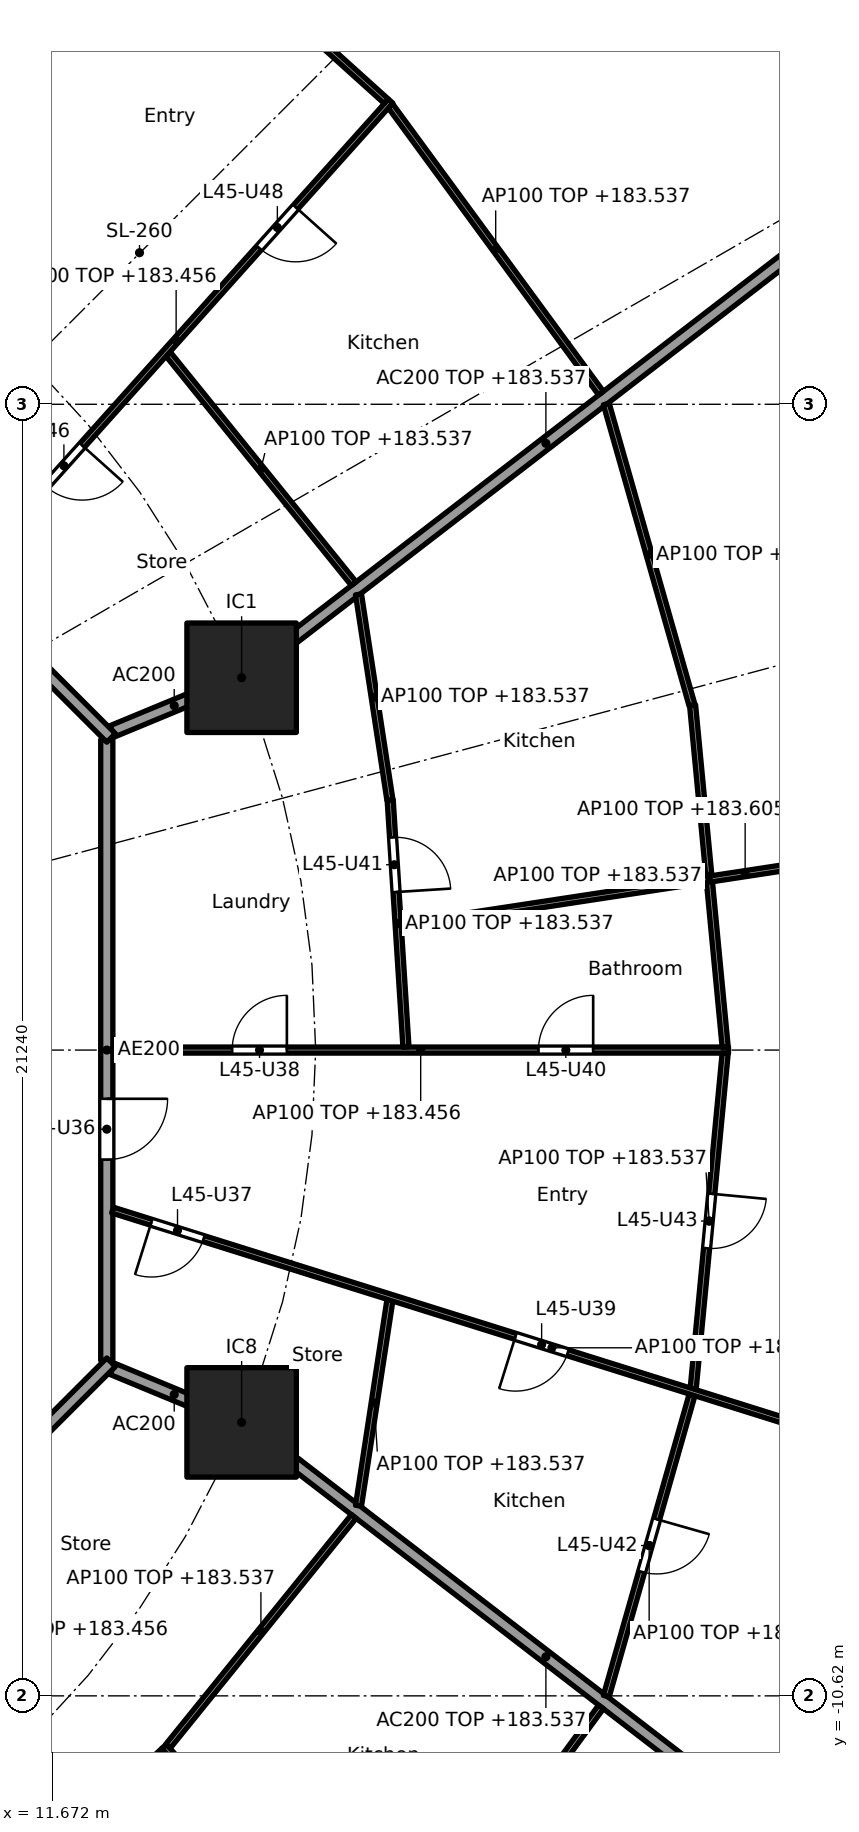
"""IFC4 building model, lengths in metres.
Left out: names, types, materials, properties, quantities, classifications, styles, units other than length and angle.
Written with IfcOpenShell. Run it as: python <this file> out.ifc"""

import sys

from ifc_helpers import new_model, si_unit, direction, frame, frame_2d, origin, origin_2d, place, context, subcontext, project, spatial, rectangle, extrude, element, fill, save


model = new_model("IFC4")
c1 = context("Model", 3, precision=1e-05, world=origin(), true_north=direction((0.0, 1.0)))
c2 = subcontext(c1, "Body", "Model", "MODEL_VIEW")
j1 = project(units=[si_unit("LENGTHUNIT", "METRE"), si_unit("PLANEANGLEUNIT", "RADIAN")], contexts=[c1])
p1 = place(None, origin())
s1 = spatial("IfcSite", under=j1, at=p1, CompositionType="ELEMENT")
p2 = place(p1, origin())
s2 = spatial("IfcBuilding", under=s1, at=p2, CompositionType="ELEMENT")
p3 = place(p2, frame((0.0, 0.0, 180.7)))
s3 = spatial("IfcBuildingStorey", under=s2, at=p3, CompositionType="ELEMENT", Elevation=180.7)
for number, where, z_axis, x_axis in (
    (1, (14.782, 6.123, 0.0), (0.0, 0.0, 1.0), (1.0, 0.0, 0.0)),
    (2, (14.782, -6.123, 0.0), (0.0, 0.0, 1.0), (1.0, 0.0, 0.0)),
):
    element("IfcColumn", number, at=place(p3, frame(where, z_axis=z_axis, x_axis=x_axis)), inside=s3, PredefinedType="COLUMN", context=c2, shape_type="SweptSolid", body=[
        extrude(rectangle(XDim=1.8, YDim=1.8, at=origin_2d()), origin(), (0.0, 0.0, 1.0), 3.7),
    ])
p4 = place(p3, frame((12.657, 5.243, 0.0), z_axis=(0.0, 0.0, 1.0), x_axis=(0.92383017907, 0.382802560388, 0.0)))
e3 = element("IfcWall", 3, at=p4, inside=s3, PredefinedType="PARTITIONING", context=c2, shape_type="SweptSolid", body=[
    extrude(rectangle(XDim=2.2, YDim=0.2, at=frame_2d((1.1, 0.0))), origin(), (0.0, 0.0, 1.0), 3.44),
])
p5 = place(p3, frame((14.822, 6.154, 0.0), z_axis=(0.0, 0.0, 1.0), x_axis=(0.792203056092, 0.610257583254, 0.0)))
e4 = element("IfcWall", 4, at=p5, inside=s3, PredefinedType="PARTITIONING", context=c2, shape_type="SweptSolid", body=[
    extrude(rectangle(XDim=12.533, YDim=0.2, at=frame_2d((6.266, 0.0))), origin(), (0.0, 0.0, 1.0), 2.837),
])
p6 = place(p3, frame((12.657, -5.243, 0.0), z_axis=(0.0, 0.0, 1.0), x_axis=(0.92383017907, -0.382802560388, 0.0)))
e5 = element("IfcWall", 5, at=p6, inside=s3, PredefinedType="PARTITIONING", context=c2, shape_type="SweptSolid", body=[
    extrude(rectangle(XDim=2.2, YDim=0.2, at=frame_2d((1.1, 0.0))), origin(), (0.0, 0.0, 1.0), 3.44),
])
p7 = place(p3, frame((14.822, -6.154, 0.0), z_axis=(0.0, 0.0, 1.0), x_axis=(0.792203056092, -0.610257583254, 0.0)))
e6 = element("IfcWall", 6, at=p7, inside=s3, PredefinedType="PARTITIONING", context=c2, shape_type="SweptSolid", body=[
    extrude(rectangle(XDim=12.533, YDim=0.2, at=frame_2d((6.266, 0.0))), origin(), (0.0, 0.0, 1.0), 2.837),
])
p8 = place(p3, frame((12.565, -5.104, 0.0), z_axis=(0.0, 0.0, 1.0), x_axis=(0.0, 1.0, 0.0)))
e7 = element("IfcWall", 7, at=p8, inside=s3, PredefinedType="PARTITIONING", context=c2, shape_type="SweptSolid", body=[
    extrude(rectangle(XDim=10.209, YDim=0.2, at=frame_2d((5.104, 0.0))), origin(), (0.0, 0.0, 1.0), 3.44),
])
p9 = place(p8, frame((3.303, 0.0, 0.0)))
e8 = element("IfcOpeningElement", 8, at=p9, cuts=e7, PredefinedType="OPENING", context=c2, shape_type="SweptSolid", body=[
    extrude(rectangle(XDim=1.0, YDim=2.1, at=frame_2d((0.5, 1.05))), frame((0.0, 0.11, 0.0), z_axis=(0.0, -1.0, 0.0), x_axis=(1.0, 0.0, 0.0)), (0.0, 0.0, 1.0), 0.22),
])
p10 = place(p3, frame((12.635, 5.134, 0.0), z_axis=(0.0, 0.0, 1.0), x_axis=(-0.707106781187, 0.707106781187, 0.0)))
e9 = element("IfcWall", 9, at=p10, inside=s3, PredefinedType="PARTITIONING", context=c2, shape_type="SweptSolid", body=[
    extrude(rectangle(XDim=10.609, YDim=0.2, at=frame_2d((5.305, 0.0))), origin(), (0.0, 0.0, 1.0), 3.44),
])
p11 = place(p10, frame((4.804, 0.0, 0.0)))
e10 = element("IfcOpeningElement", 10, at=p11, cuts=e9, PredefinedType="OPENING", context=c2, shape_type="SweptSolid", body=[
    extrude(rectangle(XDim=1.0, YDim=2.1, at=frame_2d((0.5, 1.05))), frame((0.0, 0.11, 0.0), z_axis=(0.0, -1.0, 0.0), x_axis=(1.0, 0.0, 0.0)), (0.0, 0.0, 1.0), 0.22),
])
p12 = place(p3, frame((5.275, -12.494, 0.0), z_axis=(0.0, 0.0, 1.0), x_axis=(0.707106781187, 0.707106781187, 0.0)))
e11 = element("IfcWall", 11, at=p12, inside=s3, PredefinedType="PARTITIONING", context=c2, shape_type="SweptSolid", body=[
    extrude(rectangle(XDim=10.409, YDim=0.2, at=frame_2d((5.205, 0.0))), origin(), (0.0, 0.0, 1.0), 3.44),
])
p13 = place(p3, frame((12.665, 0.0, 0.0), z_axis=(0.0, 0.0, 1.0), x_axis=(1.0, 0.0, 0.0)))
e12 = element("IfcWall", 12, at=p13, inside=s3, PredefinedType="PARTITIONING", context=c2, shape_type="SweptSolid", body=[
    extrude(rectangle(XDim=10.124, YDim=0.1, at=frame_2d((5.062, 0.0))), origin(), (0.0, 0.0, 1.0), 2.756),
])
p14 = place(p13, frame((1.961, 0.0, 0.0)))
e13 = element("IfcOpeningElement", 13, at=p14, cuts=e12, PredefinedType="OPENING", context=c2, shape_type="SweptSolid", body=[
    extrude(rectangle(XDim=0.9, YDim=2.1, at=frame_2d((0.45, 1.05))), frame((0.0, 0.06, 0.0), z_axis=(0.0, -1.0, 0.0), x_axis=(1.0, 0.0, 0.0)), (0.0, 0.0, 1.0), 0.12),
])
p15 = place(p13, frame((6.999, 0.0, 0.0)))
e14 = element("IfcOpeningElement", 14, at=p15, cuts=e12, PredefinedType="OPENING", context=c2, shape_type="SweptSolid", body=[
    extrude(rectangle(XDim=0.9, YDim=2.1, at=frame_2d((0.45, 1.05))), frame((0.0, 0.06, 0.0), z_axis=(0.0, -1.0, 0.0), x_axis=(1.0, 0.0, 0.0)), (0.0, 0.0, 1.0), 0.12),
])
p16 = place(p3, frame((17.485, 0.05, 0.0), z_axis=(0.0, 0.0, 1.0), x_axis=(-0.063673473968, 0.997970785501, 0.0)))
e15 = element("IfcWall", 15, at=p16, inside=s3, PredefinedType="PARTITIONING", context=c2, shape_type="SweptSolid", body=[
    extrude(rectangle(XDim=4.072, YDim=0.1, at=frame_2d((2.036, 0.0))), origin(), (0.0, 0.0, 1.0), 2.837),
])
p17 = place(p16, frame((2.554, 0.0, 0.0)))
e16 = element("IfcOpeningElement", 16, at=p17, cuts=e15, PredefinedType="OPENING", context=c2, shape_type="SweptSolid", body=[
    extrude(rectangle(XDim=0.9, YDim=2.1, at=frame_2d((0.45, 1.05))), frame((0.0, 0.06, 0.0), z_axis=(0.0, -1.0, 0.0), x_axis=(1.0, 0.0, 0.0)), (0.0, 0.0, 1.0), 0.12),
])
p18 = place(p3, frame((22.734, 0.05, 0.0), z_axis=(0.0, 0.0, 1.0), x_axis=(-0.0949274088, 0.995484197292, 0.0)))
e17 = element("IfcWall", 17, at=p18, inside=s3, PredefinedType="PARTITIONING", context=c2, shape_type="SweptSolid", body=[
    extrude(rectangle(XDim=5.648, YDim=0.1, at=frame_2d((2.824, 0.0))), origin(), (0.0, 0.0, 1.0), 2.837),
])
p19 = place(p3, frame((22.734, -0.05, 0.0), z_axis=(0.0, 0.0, 1.0), x_axis=(-0.094923312677, -0.995484587882, 0.0)))
e18 = element("IfcWall", 18, at=p19, inside=s3, PredefinedType="PARTITIONING", context=c2, shape_type="SweptSolid", body=[
    extrude(rectangle(XDim=5.548, YDim=0.1, at=frame_2d((2.774, 0.0))), origin(), (0.0, 0.0, 1.0), 2.837),
])
p20 = place(p19, frame((2.324, 0.0, 0.0)))
e19 = element("IfcOpeningElement", 19, at=p20, cuts=e18, PredefinedType="OPENING", context=c2, shape_type="SweptSolid", body=[
    extrude(rectangle(XDim=0.9, YDim=2.1, at=frame_2d((0.45, 1.05))), frame((0.0, 0.06, 0.0), z_axis=(0.0, -1.0, 0.0), x_axis=(1.0, 0.0, 0.0)), (0.0, 0.0, 1.0), 0.12),
])
p21 = place(p3, frame((17.407, 2.039, 0.0), z_axis=(0.0, 0.0, 1.0), x_axis=(0.98858728603, 0.150649188184, 0.0)))
e20 = element("IfcWall", 20, at=p21, inside=s3, PredefinedType="PARTITIONING", context=c2, shape_type="SweptSolid", body=[
    extrude(rectangle(XDim=11.441, YDim=0.1, at=frame_2d((5.721, 0.0))), origin(), (0.0, 0.0, 1.0), 2.905),
])
p22 = place(p21, frame((7.832, 0.0, 0.0)))
e21 = element("IfcOpeningElement", 21, at=p22, cuts=e20, PredefinedType="OPENING", context=c2, shape_type="SweptSolid", body=[
    extrude(rectangle(XDim=0.9, YDim=2.1, at=frame_2d((0.45, 1.05))), frame((0.0, 0.06, 0.0), z_axis=(0.0, -1.0, 0.0), x_axis=(1.0, 0.0, 0.0)), (0.0, 0.0, 1.0), 0.12),
])
p23 = place(p3, frame((17.221, 4.113, 0.0), z_axis=(0.0, 0.0, 1.0), x_axis=(-0.1510806336, 0.988521442434, 0.0)))
e22 = element("IfcWall", 22, at=p23, inside=s3, PredefinedType="PARTITIONING", context=c2, shape_type="SweptSolid", body=[
    extrude(rectangle(XDim=3.419, YDim=0.1, at=frame_2d((1.71, 0.0))), origin(), (0.0, 0.0, 1.0), 2.837),
])
p24 = place(p3, frame((22.189, 5.67, 0.0), z_axis=(0.0, 0.0, 1.0), x_axis=(-0.273819702124, 0.961781040949, 0.0)))
e23 = element("IfcWall", 23, at=p24, inside=s3, PredefinedType="PARTITIONING", context=c2, shape_type="SweptSolid", body=[
    extrude(rectangle(XDim=5.152, YDim=0.1, at=frame_2d((2.576, 0.0))), origin(), (0.0, 0.0, 1.0), 2.837),
])
p25 = place(p3, frame((16.626, 7.67, 0.0), z_axis=(0.0, 0.0, 1.0), x_axis=(-0.628738316533, 0.777616955399, 0.0)))
e24 = element("IfcWall", 24, at=p25, inside=s3, PredefinedType="PARTITIONING", context=c2, shape_type="SweptSolid", body=[
    extrude(rectangle(XDim=4.857, YDim=0.1, at=frame_2d((2.429, 0.0))), origin(), (0.0, 0.0, 1.0), 2.837),
])
p26 = place(p3, frame((20.692, 10.802, 0.0), z_axis=(0.0, 0.0, 1.0), x_axis=(-0.591110768293, 0.806590391468, 0.0)))
e25 = element("IfcWall", 25, at=p26, inside=s3, PredefinedType="PARTITIONING", context=c2, shape_type="SweptSolid", body=[
    extrude(rectangle(XDim=5.86, YDim=0.1, at=frame_2d((2.93, 0.0))), origin(), (0.0, 0.0, 1.0), 2.837),
])
p27 = place(p3, frame((10.178, 7.732, 0.0), z_axis=(0.0, 0.0, 1.0), x_axis=(0.667280084362, 0.744806880348, 0.0)))
e26 = element("IfcWall", 26, at=p27, inside=s3, PredefinedType="PARTITIONING", context=c2, shape_type="SweptSolid", body=[
    extrude(rectangle(XDim=10.572, YDim=0.1, at=frame_2d((5.286, 0.0))), origin(), (0.0, 0.0, 1.0), 2.756),
])
p28 = place(p27, frame((2.07, 0.0, 0.0)))
e27 = element("IfcOpeningElement", 27, at=p28, cuts=e26, PredefinedType="OPENING", context=c2, shape_type="SweptSolid", body=[
    extrude(rectangle(XDim=0.9, YDim=2.1, at=frame_2d((0.45, 1.05))), frame((0.0, 0.06, 0.0), z_axis=(0.0, -1.0, 0.0), x_axis=(1.0, 0.0, 0.0)), (0.0, 0.0, 1.0), 0.12),
])
p29 = place(p27, frame((7.331, 0.0, 0.0)))
e28 = element("IfcOpeningElement", 28, at=p29, cuts=e26, PredefinedType="OPENING", context=c2, shape_type="SweptSolid", body=[
    extrude(rectangle(XDim=0.9, YDim=2.1, at=frame_2d((0.45, 1.05))), frame((0.0, 0.06, 0.0), z_axis=(0.0, -1.0, 0.0), x_axis=(1.0, 0.0, 0.0)), (0.0, 0.0, 1.0), 0.12),
])
p30 = place(p3, frame((17.162, 15.603, 0.0), z_axis=(0.0, 0.0, 1.0), x_axis=(-0.742790086539, 0.66952437397, 0.0)))
e29 = element("IfcWall", 29, at=p30, inside=s3, PredefinedType="PARTITIONING", context=c2, shape_type="SweptSolid", body=[
    extrude(rectangle(XDim=5.542, YDim=0.1, at=frame_2d((2.771, 0.0))), origin(), (0.0, 0.0, 1.0), 2.837),
])
p31 = place(p30, frame((2.321, 0.0, 0.0)))
e30 = element("IfcOpeningElement", 30, at=p31, cuts=e29, PredefinedType="OPENING", context=c2, shape_type="SweptSolid", body=[
    extrude(rectangle(XDim=0.9, YDim=2.1, at=frame_2d((0.45, 1.05))), frame((0.0, 0.06, 0.0), z_axis=(0.0, -1.0, 0.0), x_axis=(1.0, 0.0, 0.0)), (0.0, 0.0, 1.0), 0.12),
])
p32 = place(p3, frame((7.708, 10.198, 0.0), z_axis=(0.0, 0.0, 1.0), x_axis=(0.501305229744, 0.865270516446, 0.0)))
e31 = element("IfcWall", 31, at=p32, inside=s3, PredefinedType="PARTITIONING", context=c2, shape_type="SweptSolid", body=[
    extrude(rectangle(XDim=16.064, YDim=0.1, at=frame_2d((8.032, 0.0))), origin(), (0.0, 0.0, 1.0), 2.756),
])
p33 = place(p32, frame((2.082, 0.0, 0.0)))
e32 = element("IfcOpeningElement", 32, at=p33, cuts=e31, PredefinedType="OPENING", context=c2, shape_type="SweptSolid", body=[
    extrude(rectangle(XDim=0.9, YDim=2.1, at=frame_2d((0.45, 1.05))), frame((0.0, 0.06, 0.0), z_axis=(0.0, -1.0, 0.0), x_axis=(1.0, 0.0, 0.0)), (0.0, 0.0, 1.0), 0.12),
])
p34 = place(p32, frame((7.369, 0.0, 0.0)))
e33 = element("IfcOpeningElement", 33, at=p34, cuts=e31, PredefinedType="OPENING", context=c2, shape_type="SweptSolid", body=[
    extrude(rectangle(XDim=0.9, YDim=2.1, at=frame_2d((0.45, 1.05))), frame((0.0, 0.06, 0.0), z_axis=(0.0, -1.0, 0.0), x_axis=(1.0, 0.0, 0.0)), (0.0, 0.0, 1.0), 0.12),
])
p35 = place(p32, frame((12.869, 0.0, 0.0)))
e34 = element("IfcOpeningElement", 34, at=p35, cuts=e31, PredefinedType="OPENING", context=c2, shape_type="SweptSolid", body=[
    extrude(rectangle(XDim=0.9, YDim=2.1, at=frame_2d((0.45, 1.05))), frame((0.0, 0.06, 0.0), z_axis=(0.0, -1.0, 0.0), x_axis=(1.0, 0.0, 0.0)), (0.0, 0.0, 1.0), 0.12),
])
p36 = place(p3, frame((10.21, -14.614, 0.0), z_axis=(0.0, 0.0, 1.0), x_axis=(0.728883199496, 0.684638066055, 0.0)))
e35 = element("IfcWall", 35, at=p36, inside=s3, PredefinedType="PARTITIONING", context=c2, shape_type="SweptSolid", body=[
    extrude(rectangle(XDim=4.519, YDim=0.1, at=frame_2d((2.26, 0.0))), origin(), (0.0, 0.0, 1.0), 2.837),
])
p37 = place(p3, frame((8.943, -8.966, 0.0), z_axis=(0.0, 0.0, 1.0), x_axis=(0.587187896734, -0.809450661825, 0.0)))
e36 = element("IfcWall", 36, at=p37, inside=s3, PredefinedType="PARTITIONING", context=c2, shape_type="SweptSolid", body=[
    extrude(rectangle(XDim=4.975, YDim=0.1, at=frame_2d((2.487, 0.0))), origin(), (0.0, 0.0, 1.0), 2.756),
])
p38 = place(p37, frame((2.037, 0.0, 0.0)))
e37 = element("IfcOpeningElement", 37, at=p38, cuts=e36, PredefinedType="OPENING", context=c2, shape_type="SweptSolid", body=[
    extrude(rectangle(XDim=0.9, YDim=2.1, at=frame_2d((0.45, 1.05))), frame((0.0, 0.06, 0.0), z_axis=(0.0, -1.0, 0.0), x_axis=(1.0, 0.0, 0.0)), (0.0, 0.0, 1.0), 0.12),
])
p39 = place(p3, frame((13.507, -11.449, 0.0), z_axis=(0.0, 0.0, 1.0), x_axis=(0.667299792168, -0.744789223453, 0.0)))
e38 = element("IfcWall", 38, at=p39, inside=s3, PredefinedType="PARTITIONING", context=c2, shape_type="SweptSolid", body=[
    extrude(rectangle(XDim=5.482, YDim=0.1, at=frame_2d((2.741, 0.0))), origin(), (0.0, 0.0, 1.0), 3.44),
])
p40 = place(p39, frame((2.316, 0.0, 0.0)))
e39 = element("IfcOpeningElement", 39, at=p40, cuts=e38, PredefinedType="OPENING", context=c2, shape_type="SweptSolid", body=[
    extrude(rectangle(XDim=0.9, YDim=2.1, at=frame_2d((0.45, 1.05))), frame((0.0, 0.06, 0.0), z_axis=(0.0, -1.0, 0.0), x_axis=(1.0, 0.0, 0.0)), (0.0, 0.0, 1.0), 0.12),
])
p41 = place(p3, frame((13.572, -11.447, 0.0), z_axis=(0.0, 0.0, 1.0), x_axis=(0.628738316533, 0.777616955399, 0.0)))
e40 = element("IfcWall", 40, at=p41, inside=s3, PredefinedType="PARTITIONING", context=c2, shape_type="SweptSolid", body=[
    extrude(rectangle(XDim=4.857, YDim=0.1, at=frame_2d((2.429, 0.0))), origin(), (0.0, 0.0, 1.0), 2.837),
])
p42 = place(p3, frame((17.169, -15.609, 0.0), z_axis=(0.0, 0.0, 1.0), x_axis=(0.591122127251, 0.806582066918, 0.0)))
e41 = element("IfcWall", 41, at=p42, inside=s3, PredefinedType="PARTITIONING", context=c2, shape_type="SweptSolid", body=[
    extrude(rectangle(XDim=5.96, YDim=0.1, at=frame_2d((2.98, 0.0))), origin(), (0.0, 0.0, 1.0), 2.837),
])
p43 = place(p3, frame((16.704, -7.493, 0.0), z_axis=(0.0, 0.0, 1.0), x_axis=(0.1510806336, 0.988521442434, 0.0)))
e42 = element("IfcWall", 42, at=p43, inside=s3, PredefinedType="PARTITIONING", context=c2, shape_type="SweptSolid", body=[
    extrude(rectangle(XDim=3.419, YDim=0.1, at=frame_2d((1.71, 0.0))), origin(), (0.0, 0.0, 1.0), 2.837),
])
p44 = place(p3, frame((20.779, -10.625, 0.0), z_axis=(0.0, 0.0, 1.0), x_axis=(0.273819702124, 0.961781040949, 0.0)))
e43 = element("IfcWall", 43, at=p44, inside=s3, PredefinedType="PARTITIONING", context=c2, shape_type="SweptSolid", body=[
    extrude(rectangle(XDim=5.152, YDim=0.1, at=frame_2d((2.576, 0.0))), origin(), (0.0, 0.0, 1.0), 2.837),
])
p45 = place(p44, frame((2.126, 0.0, 0.0)))
e44 = element("IfcOpeningElement", 44, at=p45, cuts=e43, PredefinedType="OPENING", context=c2, shape_type="SweptSolid", body=[
    extrude(rectangle(XDim=0.9, YDim=2.1, at=frame_2d((0.45, 1.05))), frame((0.0, 0.06, 0.0), z_axis=(0.0, -1.0, 0.0), x_axis=(1.0, 0.0, 0.0)), (0.0, 0.0, 1.0), 0.12),
])
p46 = place(p3, frame((12.66, -2.632, 0.0), z_axis=(0.0, 0.0, 1.0), x_axis=(0.954248738607, -0.299013954302, 0.0)))
e45 = element("IfcWall", 45, at=p46, inside=s3, PredefinedType="PARTITIONING", context=c2, shape_type="SweptSolid", body=[
    extrude(rectangle(XDim=15.142, YDim=0.1, at=frame_2d((7.571, 0.0))), origin(), (0.0, 0.0, 1.0), 2.756),
])
p47 = place(p46, frame((0.669, 0.0, 0.0)))
e46 = element("IfcOpeningElement", 46, at=p47, cuts=e45, PredefinedType="OPENING", context=c2, shape_type="SweptSolid", body=[
    extrude(rectangle(XDim=0.9, YDim=2.1, at=frame_2d((0.45, 1.05))), frame((0.0, 0.06, 0.0), z_axis=(0.0, -1.0, 0.0), x_axis=(1.0, 0.0, 0.0)), (0.0, 0.0, 1.0), 0.12),
])
p48 = place(p46, frame((6.944, 0.0, 0.0)))
e47 = element("IfcOpeningElement", 47, at=p48, cuts=e45, PredefinedType="OPENING", context=c2, shape_type="SweptSolid", body=[
    extrude(rectangle(XDim=0.9, YDim=2.1, at=frame_2d((0.45, 1.05))), frame((0.0, 0.06, 0.0), z_axis=(0.0, -1.0, 0.0), x_axis=(1.0, 0.0, 0.0)), (0.0, 0.0, 1.0), 0.12),
])
p49 = place(p9, frame((1.0, 0.0, 0.0), x_axis=(-1.0, 0.0, 0.0)))
e48 = element("IfcDoor", 48, at=p49, inside=s3, OperationType="SINGLE_SWING_LEFT", PredefinedType="DOOR", context=c2, shape_type="SweptSolid", body=[
    extrude(rectangle(XDim=1.0, YDim=2.1, at=frame_2d((0.5, 1.05))), frame((0.0, 0.025, 0.0), z_axis=(0.0, -1.0, 0.0), x_axis=(1.0, 0.0, 0.0)), (0.0, 0.0, 1.0), 0.05),
])
fill(e8, e48)
p50 = place(p47, frame((0.9, 0.0, 0.0), x_axis=(-1.0, 0.0, 0.0)))
e49 = element("IfcDoor", 49, at=p50, inside=s3, OperationType="SINGLE_SWING_RIGHT", PredefinedType="DOOR", context=c2, shape_type="SweptSolid", body=[
    extrude(rectangle(XDim=0.9, YDim=2.1, at=frame_2d((0.45, 1.05))), frame((0.0, 0.025, 0.0), z_axis=(0.0, -1.0, 0.0), x_axis=(1.0, 0.0, 0.0)), (0.0, 0.0, 1.0), 0.05),
])
fill(e46, e49)
p51 = place(p14, origin())
e50 = element("IfcDoor", 50, at=p51, inside=s3, OperationType="SINGLE_SWING_RIGHT", PredefinedType="DOOR", context=c2, shape_type="SweptSolid", body=[
    extrude(rectangle(XDim=0.9, YDim=2.1, at=frame_2d((0.45, 1.05))), frame((0.0, 0.025, 0.0), z_axis=(0.0, -1.0, 0.0), x_axis=(1.0, 0.0, 0.0)), (0.0, 0.0, 1.0), 0.05),
])
fill(e13, e50)
p52 = place(p48, frame((0.9, 0.0, 0.0), x_axis=(-1.0, 0.0, 0.0)))
e51 = element("IfcDoor", 51, at=p52, inside=s3, OperationType="SINGLE_SWING_RIGHT", PredefinedType="DOOR", context=c2, shape_type="SweptSolid", body=[
    extrude(rectangle(XDim=0.9, YDim=2.1, at=frame_2d((0.45, 1.05))), frame((0.0, 0.025, 0.0), z_axis=(0.0, -1.0, 0.0), x_axis=(1.0, 0.0, 0.0)), (0.0, 0.0, 1.0), 0.05),
])
fill(e47, e51)
p53 = place(p15, origin())
e52 = element("IfcDoor", 52, at=p53, inside=s3, OperationType="SINGLE_SWING_RIGHT", PredefinedType="DOOR", context=c2, shape_type="SweptSolid", body=[
    extrude(rectangle(XDim=0.9, YDim=2.1, at=frame_2d((0.45, 1.05))), frame((0.0, 0.025, 0.0), z_axis=(0.0, -1.0, 0.0), x_axis=(1.0, 0.0, 0.0)), (0.0, 0.0, 1.0), 0.05),
])
fill(e14, e52)
p54 = place(p17, frame((0.9, 0.0, 0.0), x_axis=(-1.0, 0.0, 0.0)))
e53 = element("IfcDoor", 53, at=p54, inside=s3, OperationType="SINGLE_SWING_RIGHT", PredefinedType="DOOR", context=c2, shape_type="SweptSolid", body=[
    extrude(rectangle(XDim=0.9, YDim=2.1, at=frame_2d((0.45, 1.05))), frame((0.0, 0.025, 0.0), z_axis=(0.0, -1.0, 0.0), x_axis=(1.0, 0.0, 0.0)), (0.0, 0.0, 1.0), 0.05),
])
fill(e16, e53)
p55 = place(p45, frame((0.9, 0.0, 0.0), x_axis=(-1.0, 0.0, 0.0)))
e54 = element("IfcDoor", 54, at=p55, inside=s3, OperationType="SINGLE_SWING_LEFT", PredefinedType="DOOR", context=c2, shape_type="SweptSolid", body=[
    extrude(rectangle(XDim=0.9, YDim=2.1, at=frame_2d((0.45, 1.05))), frame((0.0, 0.025, 0.0), z_axis=(0.0, -1.0, 0.0), x_axis=(1.0, 0.0, 0.0)), (0.0, 0.0, 1.0), 0.05),
])
fill(e44, e54)
p56 = place(p20, origin())
e55 = element("IfcDoor", 55, at=p56, inside=s3, OperationType="SINGLE_SWING_LEFT", PredefinedType="DOOR", context=c2, shape_type="SweptSolid", body=[
    extrude(rectangle(XDim=0.9, YDim=2.1, at=frame_2d((0.45, 1.05))), frame((0.0, 0.025, 0.0), z_axis=(0.0, -1.0, 0.0), x_axis=(1.0, 0.0, 0.0)), (0.0, 0.0, 1.0), 0.05),
])
fill(e19, e55)
p57 = place(p28, frame((0.9, 0.0, 0.0), x_axis=(-1.0, 0.0, 0.0)))
e56 = element("IfcDoor", 56, at=p57, inside=s3, OperationType="SINGLE_SWING_LEFT", PredefinedType="DOOR", context=c2, shape_type="SweptSolid", body=[
    extrude(rectangle(XDim=0.9, YDim=2.1, at=frame_2d((0.45, 1.05))), frame((0.0, 0.025, 0.0), z_axis=(0.0, -1.0, 0.0), x_axis=(1.0, 0.0, 0.0)), (0.0, 0.0, 1.0), 0.05),
])
fill(e27, e56)
p58 = place(p29, frame((0.9, 0.0, 0.0), x_axis=(-1.0, 0.0, 0.0)))
e57 = element("IfcDoor", 57, at=p58, inside=s3, OperationType="SINGLE_SWING_LEFT", PredefinedType="DOOR", context=c2, shape_type="SweptSolid", body=[
    extrude(rectangle(XDim=0.9, YDim=2.1, at=frame_2d((0.45, 1.05))), frame((0.0, 0.025, 0.0), z_axis=(0.0, -1.0, 0.0), x_axis=(1.0, 0.0, 0.0)), (0.0, 0.0, 1.0), 0.05),
])
fill(e28, e57)
save(model, sys.argv[1])
